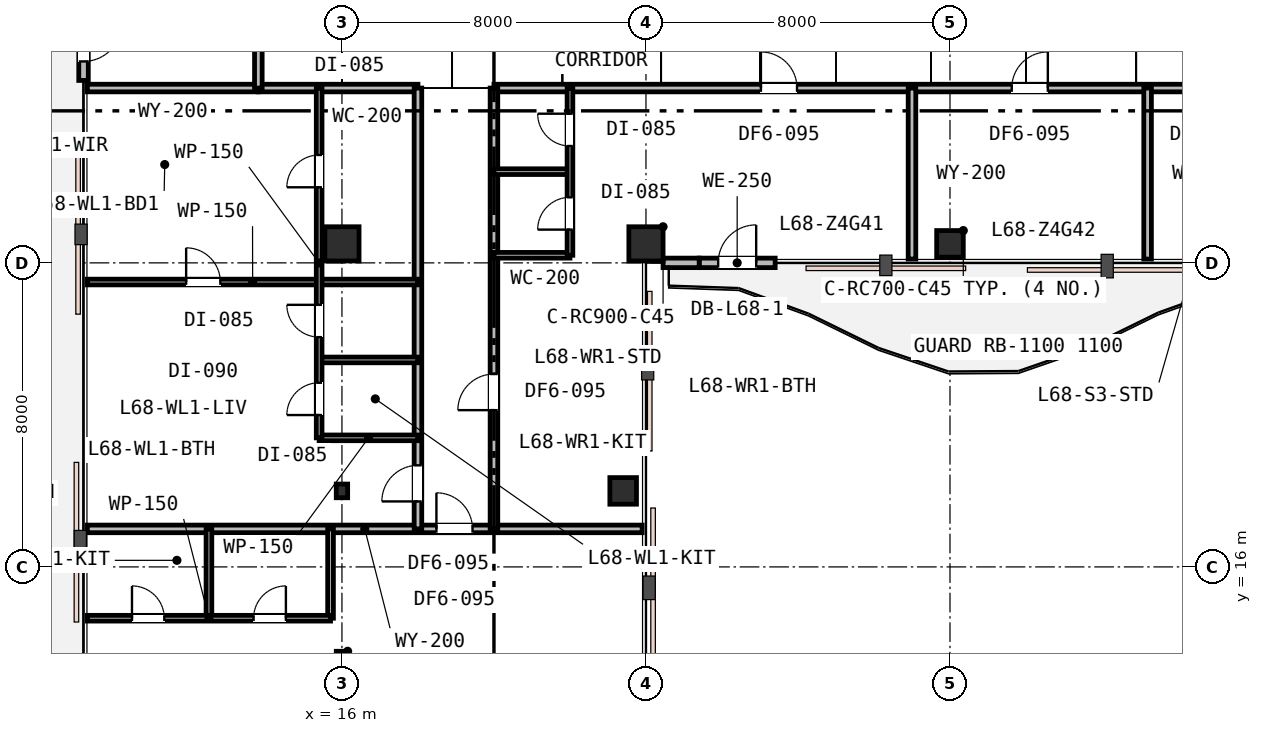
"""IFC4 building model, lengths in metres.
Left out: names, types, materials, properties, quantities, classifications, styles, units other than length and angle.
Written with IfcOpenShell. Run it as: python <this file> out.ifc"""

import sys

from ifc_helpers import new_model, si_unit, direction, frame, frame_2d, origin, origin_2d, place, context, subcontext, project, spatial, rectangle, i_section, extrude, element, fill, save


model = new_model("IFC4")
c1 = context("Model", 3, precision=1e-05, world=origin(), true_north=direction((0.0, 1.0)))
c2 = subcontext(c1, "Body", "Model", "MODEL_VIEW")
j1 = project(units=[si_unit("LENGTHUNIT", "METRE"), si_unit("PLANEANGLEUNIT", "RADIAN")], contexts=[c1])
p1 = place(None, origin())
s1 = spatial("IfcSite", under=j1, at=p1, CompositionType="ELEMENT")
p2 = place(p1, origin())
s2 = spatial("IfcBuilding", under=s1, at=p2, CompositionType="ELEMENT")
p3 = place(p2, frame((0.0, 0.0, 264.0)))
s3 = spatial("IfcBuildingStorey", under=s2, at=p3, CompositionType="ELEMENT", Elevation=264.0)
for number, where, z_axis, x_axis in (
    (1, (16.0, 24.5, 0.0), (0.0, 0.0, 1.0), (1.0, 0.0, 0.0)),
    (2, (24.0, 24.5, 0.0), (0.0, 0.0, 1.0), (1.0, 0.0, 0.0)),
):
    element("IfcColumn", number, at=place(p3, frame(where, z_axis=z_axis, x_axis=x_axis)), inside=s3, PredefinedType="COLUMN", context=c2, shape_type="SweptSolid", body=[
        extrude(rectangle(XDim=0.9, YDim=0.9, at=origin_2d()), origin(), (0.0, 0.0, 1.0), 3.8),
    ])
for number, where, z_axis, x_axis in (
    (3, (32.0, 24.5, 0.0), (0.0, 0.0, 1.0), (1.0, 0.0, 0.0)),
    (4, (23.4, 18.0, 0.0), (0.0, 0.0, 1.0), (1.0, 0.0, 0.0)),
):
    element("IfcColumn", number, at=place(p3, frame(where, z_axis=z_axis, x_axis=x_axis)), inside=s3, PredefinedType="COLUMN", context=c2, shape_type="SweptSolid", body=[
        extrude(rectangle(XDim=0.7, YDim=0.7, at=origin_2d()), origin(), (0.0, 0.0, 1.0), 3.8),
    ])
for number, where, z_axis, x_axis in (
    (5, (16.0, 13.6, 0.0), (0.0, 0.0, 1.0), (1.0, 0.0, 0.0)),
    (6, (16.0, 18.0, 0.0), (0.0, 0.0, 1.0), (1.0, 0.0, 0.0)),
):
    element("IfcColumn", number, at=place(p3, frame(where, z_axis=z_axis, x_axis=x_axis)), inside=s3, PredefinedType="COLUMN", context=c2, shape_type="SweptSolid", body=[
        extrude(i_section(OverallWidth=0.3, OverallDepth=0.36, WebThickness=0.013, FlangeThickness=0.022, FilletRadius=0.027, at=origin_2d()), origin(), (0.0, 0.0, 1.0), 3.8),
    ])
p4 = place(p3, frame((25.4, 24.0, 0.0), z_axis=(0.0, 0.0, 1.0), x_axis=(1.0, 0.0, 0.0)))
e7 = element("IfcWall", 7, at=p4, inside=s3, PredefinedType="STANDARD", context=c2, shape_type="SweptSolid", body=[
    extrude(rectangle(XDim=2.0, YDim=0.25, at=frame_2d((1.0, 0.0))), origin(), (0.0, 0.0, 1.0), 3.27),
])
p5 = place(p4, frame((0.5, 0.0, 0.0)))
e8 = element("IfcOpeningElement", 8, at=p5, cuts=e7, PredefinedType="OPENING", context=c2, shape_type="SweptSolid", body=[
    extrude(rectangle(XDim=1.0, YDim=2.15, at=frame_2d((0.5, 1.075))), frame((0.0, 0.135, 0.0), z_axis=(0.0, -1.0, 0.0), x_axis=(1.0, 0.0, 0.0)), (0.0, 0.0, 1.0), 0.27),
])
p6 = place(p3, frame((24.45, 24.0, 0.0), z_axis=(0.0, 0.0, 1.0), x_axis=(1.0, 0.0, 0.0)))
e9 = element("IfcWall", 9, at=p6, inside=s3, PredefinedType="STANDARD", context=c2, shape_type="SweptSolid", body=[
    extrude(rectangle(XDim=0.95, YDim=0.25, at=frame_2d((0.475, 0.0))), origin(), (0.0, 0.0, 1.0), 3.27),
])
p7 = place(p3, frame((9.2, 30.8, 0.0), z_axis=(0.0, 0.0, 1.0), x_axis=(0.0, -1.0, 0.0)))
e10 = element("IfcWall", 10, at=p7, inside=s3, PredefinedType="STANDARD", context=c2, shape_type="SweptSolid", body=[
    extrude(rectangle(XDim=2.0, YDim=0.25, at=frame_2d((1.0, 0.0))), origin(), (0.0, 0.0, 1.0), 3.53),
])
p8 = place(p7, frame((0.5, 0.0, 0.0)))
e11 = element("IfcOpeningElement", 11, at=p8, cuts=e10, PredefinedType="OPENING", context=c2, shape_type="SweptSolid", body=[
    extrude(rectangle(XDim=1.0, YDim=2.15, at=frame_2d((0.5, 1.075))), frame((0.0, 0.135, 0.0), z_axis=(0.0, -1.0, 0.0), x_axis=(1.0, 0.0, 0.0)), (0.0, 0.0, 1.0), 0.27),
])
p9 = place(p3, frame((9.3, 28.6, 0.0), z_axis=(0.0, 0.0, 1.0), x_axis=(1.0, 0.0, 0.0)))
e12 = element("IfcWall", 12, at=p9, inside=s3, PredefinedType="PARTITIONING", context=c2, shape_type="SweptSolid", body=[
    extrude(rectangle(XDim=4.5, YDim=0.2, at=frame_2d((2.25, 0.0))), origin(), (0.0, 0.0, 1.0), 3.53),
])
p10 = place(p3, frame((13.8, 28.6, 0.0), z_axis=(0.0, 0.0, 1.0), x_axis=(1.0, 0.0, 0.0)))
e13 = element("IfcWall", 13, at=p10, inside=s3, PredefinedType="PARTITIONING", context=c2, shape_type="SweptSolid", body=[
    extrude(rectangle(XDim=4.2, YDim=0.2, at=frame_2d((2.1, 0.0))), origin(), (0.0, 0.0, 1.0), 3.16),
])
p11 = place(p3, frame((20.0, 28.6, 0.0), z_axis=(0.0, 0.0, 1.0), x_axis=(1.0, 0.0, 0.0)))
e14 = element("IfcWall", 14, at=p11, inside=s3, PredefinedType="PARTITIONING", context=c2, shape_type="SweptSolid", body=[
    extrude(rectangle(XDim=25.9, YDim=0.2, at=frame_2d((12.95, 0.0))), origin(), (0.0, 0.0, 1.0), 3.16),
])
p12 = place(p11, frame((7.025, 0.0, 0.0)))
e15 = element("IfcOpeningElement", 15, at=p12, cuts=e14, PredefinedType="OPENING", context=c2, shape_type="SweptSolid", body=[
    extrude(rectangle(XDim=0.95, YDim=2.15, at=frame_2d((0.475, 1.075))), frame((0.0, 0.11, 0.0), z_axis=(0.0, -1.0, 0.0), x_axis=(1.0, 0.0, 0.0)), (0.0, 0.0, 1.0), 0.22),
])
p13 = place(p11, frame((13.625, 0.0, 0.0)))
e16 = element("IfcOpeningElement", 16, at=p13, cuts=e14, PredefinedType="OPENING", context=c2, shape_type="SweptSolid", body=[
    extrude(rectangle(XDim=0.95, YDim=2.15, at=frame_2d((0.475, 1.075))), frame((0.0, 0.11, 0.0), z_axis=(0.0, -1.0, 0.0), x_axis=(1.0, 0.0, 0.0)), (0.0, 0.0, 1.0), 0.22),
])
p14 = place(p11, frame((18.378, 0.0, 0.0)))
e17 = element("IfcOpeningElement", 17, at=p14, cuts=e14, PredefinedType="OPENING", context=c2, shape_type="SweptSolid", body=[
    extrude(rectangle(XDim=0.95, YDim=2.15, at=frame_2d((0.475, 1.075))), frame((0.0, 0.11, 0.0), z_axis=(0.0, -1.0, 0.0), x_axis=(1.0, 0.0, 0.0)), (0.0, 0.0, 1.0), 0.22),
])
p15 = place(p3, frame((13.8, 28.6, 0.0), z_axis=(0.0, 0.0, 1.0), x_axis=(0.0, 1.0, 0.0)))
e18 = element("IfcWall", 18, at=p15, inside=s3, PredefinedType="PARTITIONING", context=c2, shape_type="SweptSolid", body=[
    extrude(rectangle(XDim=7.4, YDim=0.2, at=frame_2d((3.7, 0.0))), origin(), (0.0, 0.0, 1.0), 3.53),
])
p16 = place(p15, frame((4.325, 0.0, 0.0)))
e19 = element("IfcOpeningElement", 19, at=p16, cuts=e18, PredefinedType="OPENING", context=c2, shape_type="SweptSolid", body=[
    extrude(rectangle(XDim=0.95, YDim=2.15, at=frame_2d((0.475, 1.075))), frame((0.0, 0.11, 0.0), z_axis=(0.0, -1.0, 0.0), x_axis=(1.0, 0.0, 0.0)), (0.0, 0.0, 1.0), 0.22),
])
for number, where, z_axis, x_axis in (
    (20, (31.0, 24.1, 0.0), (0.0, 0.0, 1.0), (0.0, 1.0, 0.0)),
    (21, (37.2, 24.1, 0.0), (0.0, 0.0, 1.0), (0.0, 1.0, 0.0)),
):
    element("IfcWall", number, at=place(p3, frame(where, z_axis=z_axis, x_axis=x_axis)), inside=s3, PredefinedType="PARTITIONING", context=c2, shape_type="SweptSolid", body=[
        extrude(rectangle(XDim=4.5, YDim=0.2, at=frame_2d((2.25, 0.0))), origin(), (0.0, 0.0, 1.0), 3.27),
    ])
p17 = place(p3, frame((9.3, 17.0, 0.0), z_axis=(0.0, 0.0, 1.0), x_axis=(1.0, 0.0, 0.0)))
e22 = element("IfcWall", 22, at=p17, inside=s3, PredefinedType="PARTITIONING", context=c2, shape_type="SweptSolid", body=[
    extrude(rectangle(XDim=14.6, YDim=0.2, at=frame_2d((7.3, 0.0))), origin(), (0.0, 0.0, 1.0), 3.16),
])
p18 = place(p17, frame((9.186, 0.0, 0.0)))
e23 = element("IfcOpeningElement", 23, at=p18, cuts=e22, PredefinedType="OPENING", context=c2, shape_type="SweptSolid", body=[
    extrude(rectangle(XDim=0.95, YDim=2.15, at=frame_2d((0.475, 1.075))), frame((0.0, 0.11, 0.0), z_axis=(0.0, -1.0, 0.0), x_axis=(1.0, 0.0, 0.0)), (0.0, 0.0, 1.0), 0.22),
])
p19 = place(p3, frame((18.0, 17.0, 0.0), z_axis=(0.0, 0.0, 1.0), x_axis=(0.0, 1.0, 0.0)))
e24 = element("IfcWall", 24, at=p19, inside=s3, PredefinedType="PARTITIONING", context=c2, shape_type="SweptSolid", body=[
    extrude(rectangle(XDim=11.6, YDim=0.2, at=frame_2d((5.8, 0.0))), origin(), (0.0, 0.0, 1.0), 3.16),
])
p20 = place(p19, frame((0.723, 0.0, 0.0)))
e25 = element("IfcOpeningElement", 25, at=p20, cuts=e24, PredefinedType="OPENING", context=c2, shape_type="SweptSolid", body=[
    extrude(rectangle(XDim=0.95, YDim=2.15, at=frame_2d((0.475, 1.075))), frame((0.0, 0.11, 0.0), z_axis=(0.0, -1.0, 0.0), x_axis=(1.0, 0.0, 0.0)), (0.0, 0.0, 1.0), 0.22),
])
for number, where, z_axis, x_axis in (
    (26, (15.4, 19.396, 0.0), (0.0, 0.0, 1.0), (1.0, 0.0, 0.0)),
    (27, (15.4, 21.446, 0.0), (0.0, 0.0, 1.0), (1.0, 0.0, 0.0)),
):
    element("IfcWall", number, at=place(p3, frame(where, z_axis=z_axis, x_axis=x_axis)), inside=s3, PredefinedType="PARTITIONING", context=c2, shape_type="SweptSolid", body=[
        extrude(rectangle(XDim=2.6, YDim=0.15, at=frame_2d((1.3, 0.0))), origin(), (0.0, 0.0, 1.0), 3.16),
    ])
p21 = place(p3, frame((9.3, 23.496, 0.0), z_axis=(0.0, 0.0, 1.0), x_axis=(1.0, 0.0, 0.0)))
e28 = element("IfcWall", 28, at=p21, inside=s3, PredefinedType="PARTITIONING", context=c2, shape_type="SweptSolid", body=[
    extrude(rectangle(XDim=8.7, YDim=0.15, at=frame_2d((4.35, 0.0))), origin(), (0.0, 0.0, 1.0), 3.16),
])
p22 = place(p21, frame((2.6, 0.0, 0.0)))
e29 = element("IfcOpeningElement", 29, at=p22, cuts=e28, PredefinedType="OPENING", context=c2, shape_type="SweptSolid", body=[
    extrude(rectangle(XDim=0.9, YDim=2.15, at=frame_2d((0.45, 1.075))), frame((0.0, 0.085, 0.0), z_axis=(0.0, -1.0, 0.0), x_axis=(1.0, 0.0, 0.0)), (0.0, 0.0, 1.0), 0.17),
])
p23 = place(p3, frame((15.4, 19.396, 0.0), z_axis=(0.0, 0.0, 1.0), x_axis=(0.0, 1.0, 0.0)))
e30 = element("IfcWall", 30, at=p23, inside=s3, PredefinedType="PARTITIONING", context=c2, shape_type="SweptSolid", body=[
    extrude(rectangle(XDim=9.204, YDim=0.15, at=frame_2d((4.602, 0.0))), origin(), (0.0, 0.0, 1.0), 3.53),
])
p24 = place(p23, frame((0.6, 0.0, 0.0)))
e31 = element("IfcOpeningElement", 31, at=p24, cuts=e30, PredefinedType="OPENING", context=c2, shape_type="SweptSolid", body=[
    extrude(rectangle(XDim=0.85, YDim=2.15, at=frame_2d((0.425, 1.075))), frame((0.0, 0.085, 0.0), z_axis=(0.0, -1.0, 0.0), x_axis=(1.0, 0.0, 0.0)), (0.0, 0.0, 1.0), 0.17),
])
p25 = place(p23, frame((2.65, 0.0, 0.0)))
e32 = element("IfcOpeningElement", 32, at=p25, cuts=e30, PredefinedType="OPENING", context=c2, shape_type="SweptSolid", body=[
    extrude(rectangle(XDim=0.85, YDim=2.15, at=frame_2d((0.425, 1.075))), frame((0.0, 0.085, 0.0), z_axis=(0.0, -1.0, 0.0), x_axis=(1.0, 0.0, 0.0)), (0.0, 0.0, 1.0), 0.17),
])
p26 = place(p23, frame((6.593, 0.0, 0.0)))
e33 = element("IfcOpeningElement", 33, at=p26, cuts=e30, PredefinedType="OPENING", context=c2, shape_type="SweptSolid", body=[
    extrude(rectangle(XDim=0.85, YDim=2.15, at=frame_2d((0.425, 1.075))), frame((0.0, 0.085, 0.0), z_axis=(0.0, -1.0, 0.0), x_axis=(1.0, 0.0, 0.0)), (0.0, 0.0, 1.0), 0.17),
])
p27 = place(p3, frame((20.0, 17.0, 0.0), z_axis=(0.0, 0.0, 1.0), x_axis=(0.0, 1.0, 0.0)))
e34 = element("IfcWall", 34, at=p27, inside=s3, PredefinedType="PARTITIONING", context=c2, shape_type="SweptSolid", body=[
    extrude(rectangle(XDim=11.6, YDim=0.2, at=frame_2d((5.8, 0.0))), origin(), (0.0, 0.0, 1.0), 3.16),
])
p28 = place(p27, frame((3.125, 0.0, 0.0)))
e35 = element("IfcOpeningElement", 35, at=p28, cuts=e34, PredefinedType="OPENING", context=c2, shape_type="SweptSolid", body=[
    extrude(rectangle(XDim=0.95, YDim=2.15, at=frame_2d((0.475, 1.075))), frame((0.0, 0.11, 0.0), z_axis=(0.0, -1.0, 0.0), x_axis=(1.0, 0.0, 0.0)), (0.0, 0.0, 1.0), 0.22),
])
p29 = place(p3, frame((20.0, 24.2, 0.0), z_axis=(0.0, 0.0, 1.0), x_axis=(1.0, 0.0, 0.0)))
e36 = element("IfcWall", 36, at=p29, inside=s3, PredefinedType="PARTITIONING", context=c2, shape_type="SweptSolid", body=[
    extrude(rectangle(XDim=2.0, YDim=0.15, at=frame_2d((1.0, 0.0))), origin(), (0.0, 0.0, 1.0), 3.16),
])
p30 = place(p3, frame((20.0, 26.4, 0.0), z_axis=(0.0, 0.0, 1.0), x_axis=(1.0, 0.0, 0.0)))
e37 = element("IfcWall", 37, at=p30, inside=s3, PredefinedType="PARTITIONING", context=c2, shape_type="SweptSolid", body=[
    extrude(rectangle(XDim=2.0, YDim=0.15, at=frame_2d((1.0, 0.0))), origin(), (0.0, 0.0, 1.0), 3.28),
])
p31 = place(p3, frame((22.0, 24.2, 0.0), z_axis=(0.0, 0.0, 1.0), x_axis=(0.0, 1.0, 0.0)))
e38 = element("IfcWall", 38, at=p31, inside=s3, PredefinedType="PARTITIONING", context=c2, shape_type="SweptSolid", body=[
    extrude(rectangle(XDim=4.4, YDim=0.15, at=frame_2d((2.2, 0.0))), origin(), (0.0, 0.0, 1.0), 3.16),
])
p32 = place(p31, frame((0.675, 0.0, 0.0)))
e39 = element("IfcOpeningElement", 39, at=p32, cuts=e38, PredefinedType="OPENING", context=c2, shape_type="SweptSolid", body=[
    extrude(rectangle(XDim=0.85, YDim=2.15, at=frame_2d((0.425, 1.075))), frame((0.0, 0.085, 0.0), z_axis=(0.0, -1.0, 0.0), x_axis=(1.0, 0.0, 0.0)), (0.0, 0.0, 1.0), 0.17),
])
p33 = place(p31, frame((2.875, 0.0, 0.0)))
e40 = element("IfcOpeningElement", 40, at=p33, cuts=e38, PredefinedType="OPENING", context=c2, shape_type="SweptSolid", body=[
    extrude(rectangle(XDim=0.85, YDim=2.15, at=frame_2d((0.425, 1.075))), frame((0.0, 0.085, 0.0), z_axis=(0.0, -1.0, 0.0), x_axis=(1.0, 0.0, 0.0)), (0.0, 0.0, 1.0), 0.17),
])
p34 = place(p3, frame((15.7, 14.65, 0.0), z_axis=(0.0, 0.0, 1.0), x_axis=(0.0, 1.0, 0.0)))
e41 = element("IfcWall", 41, at=p34, inside=s3, PredefinedType="PARTITIONING", context=c2, shape_type="SweptSolid", body=[
    extrude(rectangle(XDim=2.35, YDim=0.15, at=frame_2d((1.175, 0.0))), origin(), (0.0, 0.0, 1.0), 3.16),
])
p35 = place(p3, frame((12.5, 14.65, 0.0), z_axis=(0.0, 0.0, 1.0), x_axis=(0.0, 1.0, 0.0)))
e42 = element("IfcWall", 42, at=p35, inside=s3, PredefinedType="PARTITIONING", context=c2, shape_type="SweptSolid", body=[
    extrude(rectangle(XDim=2.35, YDim=0.15, at=frame_2d((1.175, 0.0))), origin(), (0.0, 0.0, 1.0), 3.53),
])
p36 = place(p3, frame((9.3, 14.65, 0.0), z_axis=(0.0, 0.0, 1.0), x_axis=(1.0, 0.0, 0.0)))
e43 = element("IfcWall", 43, at=p36, inside=s3, PredefinedType="PARTITIONING", context=c2, shape_type="SweptSolid", body=[
    extrude(rectangle(XDim=6.4, YDim=0.15, at=frame_2d((3.2, 0.0))), origin(), (0.0, 0.0, 1.0), 3.16),
])
p37 = place(p36, frame((1.175, 0.0, 0.0)))
e44 = element("IfcOpeningElement", 44, at=p37, cuts=e43, PredefinedType="OPENING", context=c2, shape_type="SweptSolid", body=[
    extrude(rectangle(XDim=0.85, YDim=2.15, at=frame_2d((0.425, 1.075))), frame((0.0, 0.085, 0.0), z_axis=(0.0, -1.0, 0.0), x_axis=(1.0, 0.0, 0.0)), (0.0, 0.0, 1.0), 0.17),
])
p38 = place(p36, frame((4.375, 0.0, 0.0)))
e45 = element("IfcOpeningElement", 45, at=p38, cuts=e43, PredefinedType="OPENING", context=c2, shape_type="SweptSolid", body=[
    extrude(rectangle(XDim=0.85, YDim=2.15, at=frame_2d((0.425, 1.075))), frame((0.0, 0.085, 0.0), z_axis=(0.0, -1.0, 0.0), x_axis=(1.0, 0.0, 0.0)), (0.0, 0.0, 1.0), 0.17),
])
p39 = place(p5, origin())
e46 = element("IfcDoor", 46, at=p39, inside=s3, OperationType="SINGLE_SWING_RIGHT", PredefinedType="DOOR", context=c2, shape_type="SweptSolid", body=[
    extrude(rectangle(XDim=1.0, YDim=2.15, at=frame_2d((0.5, 1.075))), frame((0.0, 0.025, 0.0), z_axis=(0.0, -1.0, 0.0), x_axis=(1.0, 0.0, 0.0)), (0.0, 0.0, 1.0), 0.05),
])
fill(e8, e46)
p40 = place(p8, origin())
e47 = element("IfcDoor", 47, at=p40, inside=s3, OperationType="SINGLE_SWING_LEFT", PredefinedType="DOOR", context=c2, shape_type="SweptSolid", body=[
    extrude(rectangle(XDim=1.0, YDim=2.15, at=frame_2d((0.5, 1.075))), frame((0.0, 0.025, 0.0), z_axis=(0.0, -1.0, 0.0), x_axis=(1.0, 0.0, 0.0)), (0.0, 0.0, 1.0), 0.05),
])
fill(e11, e47)
p41 = place(p12, origin())
e48 = element("IfcDoor", 48, at=p41, inside=s3, OperationType="SINGLE_SWING_LEFT", PredefinedType="DOOR", context=c2, shape_type="SweptSolid", body=[
    extrude(rectangle(XDim=0.95, YDim=2.15, at=frame_2d((0.475, 1.075))), frame((0.0, 0.025, 0.0), z_axis=(0.0, -1.0, 0.0), x_axis=(1.0, 0.0, 0.0)), (0.0, 0.0, 1.0), 0.05),
])
fill(e15, e48)
p42 = place(p13, origin())
e49 = element("IfcDoor", 49, at=p42, inside=s3, OperationType="SINGLE_SWING_RIGHT", PredefinedType="DOOR", context=c2, shape_type="SweptSolid", body=[
    extrude(rectangle(XDim=0.95, YDim=2.15, at=frame_2d((0.475, 1.075))), frame((0.0, 0.025, 0.0), z_axis=(0.0, -1.0, 0.0), x_axis=(1.0, 0.0, 0.0)), (0.0, 0.0, 1.0), 0.05),
])
fill(e16, e49)
p43 = place(p20, origin())
e50 = element("IfcDoor", 50, at=p43, inside=s3, OperationType="SINGLE_SWING_LEFT", PredefinedType="DOOR", context=c2, shape_type="SweptSolid", body=[
    extrude(rectangle(XDim=0.95, YDim=2.15, at=frame_2d((0.475, 1.075))), frame((0.0, 0.025, 0.0), z_axis=(0.0, -1.0, 0.0), x_axis=(1.0, 0.0, 0.0)), (0.0, 0.0, 1.0), 0.05),
])
fill(e25, e50)
p44 = place(p24, origin())
e51 = element("IfcDoor", 51, at=p44, inside=s3, OperationType="SINGLE_SWING_LEFT", PredefinedType="DOOR", context=c2, shape_type="SweptSolid", body=[
    extrude(rectangle(XDim=0.85, YDim=2.15, at=frame_2d((0.425, 1.075))), frame((0.0, 0.025, 0.0), z_axis=(0.0, -1.0, 0.0), x_axis=(1.0, 0.0, 0.0)), (0.0, 0.0, 1.0), 0.05),
])
fill(e31, e51)
p45 = place(p25, origin())
e52 = element("IfcDoor", 52, at=p45, inside=s3, OperationType="SINGLE_SWING_RIGHT", PredefinedType="DOOR", context=c2, shape_type="SweptSolid", body=[
    extrude(rectangle(XDim=0.85, YDim=2.15, at=frame_2d((0.425, 1.075))), frame((0.0, 0.025, 0.0), z_axis=(0.0, -1.0, 0.0), x_axis=(1.0, 0.0, 0.0)), (0.0, 0.0, 1.0), 0.05),
])
fill(e32, e52)
p46 = place(p26, origin())
e53 = element("IfcDoor", 53, at=p46, inside=s3, OperationType="SINGLE_SWING_LEFT", PredefinedType="DOOR", context=c2, shape_type="SweptSolid", body=[
    extrude(rectangle(XDim=0.85, YDim=2.15, at=frame_2d((0.425, 1.075))), frame((0.0, 0.025, 0.0), z_axis=(0.0, -1.0, 0.0), x_axis=(1.0, 0.0, 0.0)), (0.0, 0.0, 1.0), 0.05),
])
fill(e33, e53)
p47 = place(p22, origin())
e54 = element("IfcDoor", 54, at=p47, inside=s3, OperationType="SINGLE_SWING_LEFT", PredefinedType="DOOR", context=c2, shape_type="SweptSolid", body=[
    extrude(rectangle(XDim=0.9, YDim=2.15, at=frame_2d((0.45, 1.075))), frame((0.0, 0.025, 0.0), z_axis=(0.0, -1.0, 0.0), x_axis=(1.0, 0.0, 0.0)), (0.0, 0.0, 1.0), 0.05),
])
fill(e29, e54)
p48 = place(p28, origin())
e55 = element("IfcDoor", 55, at=p48, inside=s3, OperationType="SINGLE_SWING_LEFT", PredefinedType="DOOR", context=c2, shape_type="SweptSolid", body=[
    extrude(rectangle(XDim=0.95, YDim=2.15, at=frame_2d((0.475, 1.075))), frame((0.0, 0.025, 0.0), z_axis=(0.0, -1.0, 0.0), x_axis=(1.0, 0.0, 0.0)), (0.0, 0.0, 1.0), 0.05),
])
fill(e35, e55)
p49 = place(p32, origin())
e56 = element("IfcDoor", 56, at=p49, inside=s3, OperationType="SINGLE_SWING_LEFT", PredefinedType="DOOR", context=c2, shape_type="SweptSolid", body=[
    extrude(rectangle(XDim=0.85, YDim=2.15, at=frame_2d((0.425, 1.075))), frame((0.0, 0.025, 0.0), z_axis=(0.0, -1.0, 0.0), x_axis=(1.0, 0.0, 0.0)), (0.0, 0.0, 1.0), 0.05),
])
fill(e39, e56)
p50 = place(p33, origin())
e57 = element("IfcDoor", 57, at=p50, inside=s3, OperationType="SINGLE_SWING_RIGHT", PredefinedType="DOOR", context=c2, shape_type="SweptSolid", body=[
    extrude(rectangle(XDim=0.85, YDim=2.15, at=frame_2d((0.425, 1.075))), frame((0.0, 0.025, 0.0), z_axis=(0.0, -1.0, 0.0), x_axis=(1.0, 0.0, 0.0)), (0.0, 0.0, 1.0), 0.05),
])
fill(e40, e57)
p51 = place(p18, origin())
e58 = element("IfcDoor", 58, at=p51, inside=s3, OperationType="SINGLE_SWING_LEFT", PredefinedType="DOOR", context=c2, shape_type="SweptSolid", body=[
    extrude(rectangle(XDim=0.95, YDim=2.15, at=frame_2d((0.475, 1.075))), frame((0.0, 0.025, 0.0), z_axis=(0.0, -1.0, 0.0), x_axis=(1.0, 0.0, 0.0)), (0.0, 0.0, 1.0), 0.05),
])
fill(e23, e58)
p52 = place(p37, origin())
e59 = element("IfcDoor", 59, at=p52, inside=s3, OperationType="SINGLE_SWING_LEFT", PredefinedType="DOOR", context=c2, shape_type="SweptSolid", body=[
    extrude(rectangle(XDim=0.85, YDim=2.15, at=frame_2d((0.425, 1.075))), frame((0.0, 0.025, 0.0), z_axis=(0.0, -1.0, 0.0), x_axis=(1.0, 0.0, 0.0)), (0.0, 0.0, 1.0), 0.05),
])
fill(e44, e59)
p53 = place(p38, origin())
e60 = element("IfcDoor", 60, at=p53, inside=s3, OperationType="SINGLE_SWING_RIGHT", PredefinedType="DOOR", context=c2, shape_type="SweptSolid", body=[
    extrude(rectangle(XDim=0.85, YDim=2.15, at=frame_2d((0.425, 1.075))), frame((0.0, 0.025, 0.0), z_axis=(0.0, -1.0, 0.0), x_axis=(1.0, 0.0, 0.0)), (0.0, 0.0, 1.0), 0.05),
])
fill(e45, e60)
save(model, sys.argv[1])
